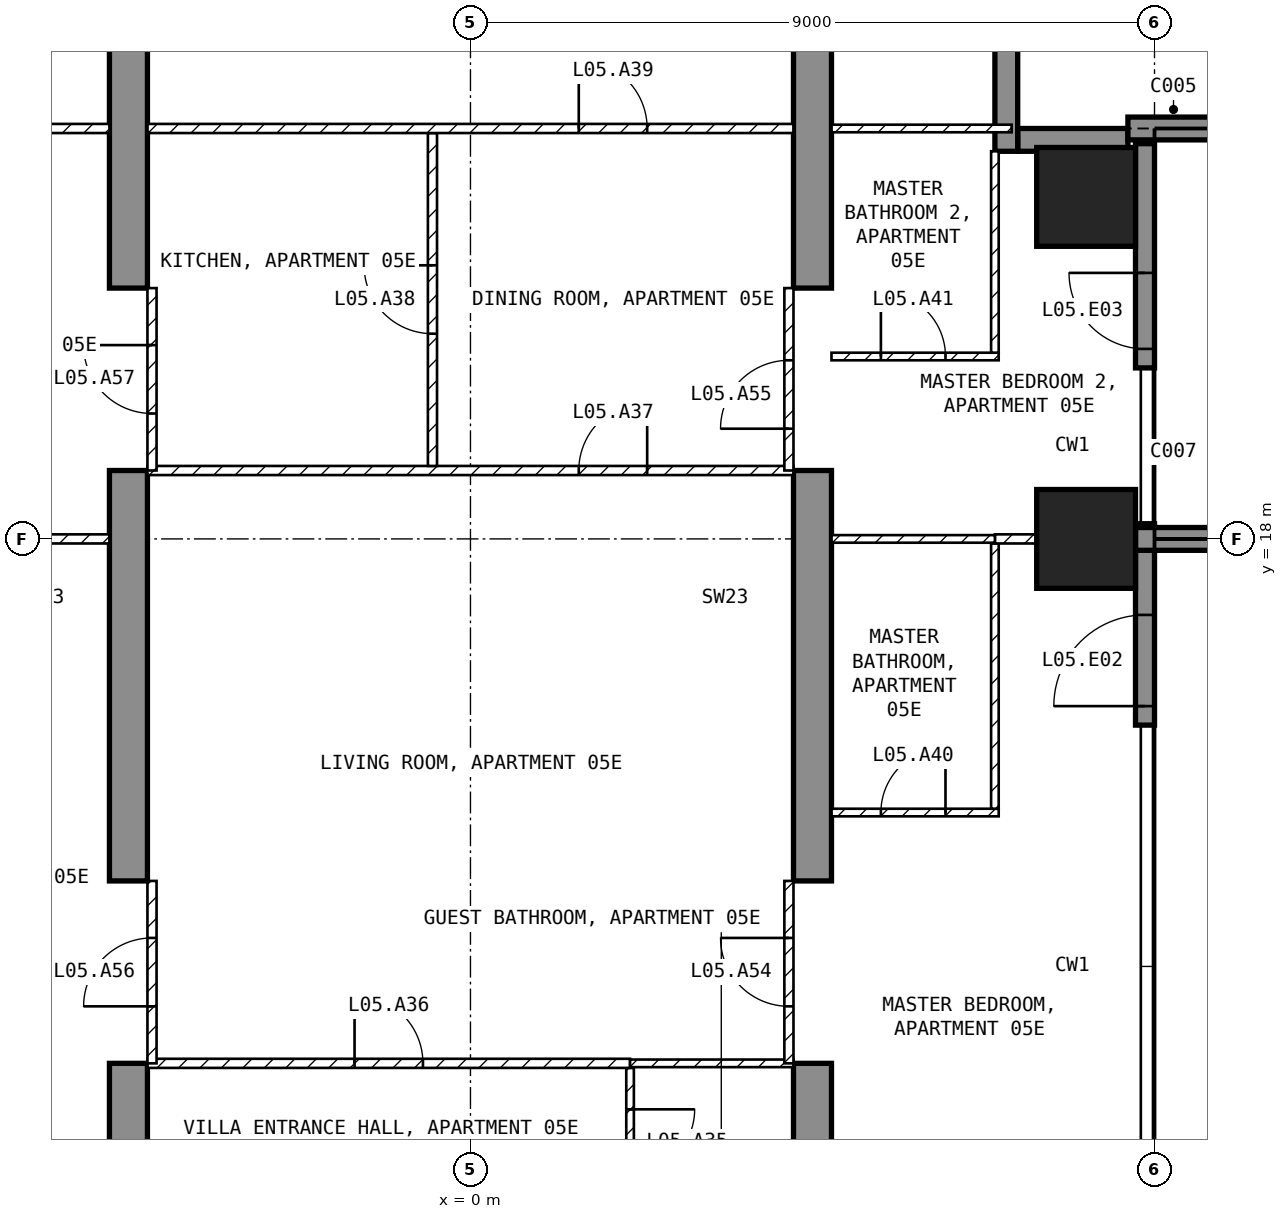
"""IFC4 building model, lengths in metres.
Left out: names, types, materials, properties, quantities, classifications, styles, units other than length and angle.
Written with IfcOpenShell. Run it as: python <this file> out.ifc"""

import sys

from ifc_helpers import new_model, si_unit, direction, frame, frame_2d, origin, origin_2d, place, context, subcontext, project, spatial, polyline, rectangle, outline, extrude, element, fill, save


model = new_model("IFC4")
c1 = context("Model", 3, precision=1e-05, world=origin(), true_north=direction((0.0, 1.0)))
c2 = subcontext(c1, "Body", "Model", "MODEL_VIEW")
j1 = project(units=[si_unit("LENGTHUNIT", "METRE"), si_unit("PLANEANGLEUNIT", "RADIAN")], contexts=[c1])
p1 = place(None, origin())
s1 = spatial("IfcSite", under=j1, at=p1, CompositionType="ELEMENT")
p2 = place(p1, origin())
s2 = spatial("IfcBuilding", under=s1, at=p2, CompositionType="ELEMENT")
p3 = place(p2, frame((0.0, 0.0, 36.5)))
s3 = spatial("IfcBuildingStorey", under=s2, at=p3, CompositionType="ELEMENT", Elevation=36.5)
for number, where, z_axis, x_axis in (
    (1, (8.1, 18.0, -0.25), (0.0, 0.0, 1.0), (1.0, 0.0, 0.0)),
    (2, (8.1, 22.5, -0.25), (0.0, 0.0, 1.0), (1.0, 0.0, 0.0)),
):
    element("IfcColumn", number, at=place(p3, frame(where, z_axis=z_axis, x_axis=x_axis)), inside=s3, PredefinedType="COLUMN", context=c2, shape_type="SweptSolid", body=[
        extrude(rectangle(XDim=1.3, YDim=1.3, at=origin_2d()), origin(), (0.0, 0.0, 1.0), 3.5),
    ])
for number, where, z_axis, x_axis in (
    (3, (-4.75, 9.0, -0.25), (1.0, 0.0, 0.0), (0.0, 1.0, 0.0)),
    (4, (4.25, 9.0, -0.25), (1.0, 0.0, 0.0), (0.0, 1.0, 0.0)),
):
    element("IfcWall", number, at=place(p3, frame(where, z_axis=z_axis, x_axis=x_axis)), inside=s3, PredefinedType="SHEAR", context=c2, shape_type="SweptSolid", body=[
        extrude(outline(polyline([(0.0, 0.0), (2.1, 0.0), (2.1, 2.65), (4.5, 2.65), (4.5, 0.0), (9.9, 0.0), (9.9, 2.65), (12.3, 2.65), (12.3, 0.0), (16.45, 0.0), (16.45, 3.5), (0.0, 3.5), (0.0, 0.0)])), origin(), (0.0, 0.0, 1.0), 0.5),
    ])
p4 = place(p3, frame((8.875, 15.55, 0.0), z_axis=(0.0, 0.0, 1.0), x_axis=(0.0, 1.0, 0.0)))
e5 = element("IfcWall", 5, at=p4, inside=s3, PredefinedType="SOLIDWALL", context=c2, shape_type="SweptSolid", body=[
    extrude(rectangle(XDim=2.65, YDim=0.25, at=frame_2d((1.325, 0.0))), origin(), (0.0, 0.0, 1.0), 3.25),
])
p5 = place(p4, frame((0.25, 0.0, 0.0)))
e6 = element("IfcOpeningElement", 6, at=p5, cuts=e5, PredefinedType="OPENING", context=c2, shape_type="SweptSolid", body=[
    extrude(rectangle(XDim=1.2, YDim=2.4, at=frame_2d((0.6, 1.2))), frame((0.0, 0.135, 0.0), z_axis=(0.0, -1.0, 0.0), x_axis=(1.0, 0.0, 0.0)), (0.0, 0.0, 1.0), 0.27),
])
p6 = place(p3, frame((8.875, 20.25, 0.0), z_axis=(0.0, 0.0, 1.0), x_axis=(0.0, 1.0, 0.0)))
e7 = element("IfcWall", 7, at=p6, inside=s3, PredefinedType="SOLIDWALL", context=c2, shape_type="SweptSolid", body=[
    extrude(rectangle(XDim=2.95, YDim=0.25, at=frame_2d((1.475, 0.0))), origin(), (0.0, 0.0, 1.0), 3.25),
])
p7 = place(p6, frame((0.25, 0.0, 0.0)))
e8 = element("IfcOpeningElement", 8, at=p7, cuts=e7, PredefinedType="OPENING", context=c2, shape_type="SweptSolid", body=[
    extrude(rectangle(XDim=1.0, YDim=2.4, at=frame_2d((0.5, 1.2))), frame((0.0, 0.135, 0.0), z_axis=(0.0, -1.0, 0.0), x_axis=(1.0, 0.0, 0.0)), (0.0, 0.0, 1.0), 0.27),
])
p8 = place(p3, frame((8.65, 23.25, 0.0), z_axis=(0.0, 0.0, 1.0), x_axis=(-1.0, 0.0, 0.0)))
e9 = element("IfcWall", 9, at=p8, inside=s3, PredefinedType="SOLIDWALL", context=c2, shape_type="SweptSolid", body=[
    extrude(rectangle(XDim=1.45, YDim=0.3, at=frame_2d((0.725, 0.0))), origin(), (0.0, 0.0, 1.0), 3.25),
])
p9 = place(p3, frame((7.05, 23.1, 0.0), z_axis=(0.0, 0.0, 1.0), x_axis=(0.0, 1.0, 0.0)))
e10 = element("IfcWall", 10, at=p9, inside=s3, PredefinedType="SOLIDWALL", context=c2, shape_type="SweptSolid", body=[
    extrude(rectangle(XDim=1.8, YDim=0.3, at=frame_2d((0.9, 0.0))), origin(), (0.0, 0.0, 1.0), 3.25),
])
p10 = place(p3, frame((8.75, 18.0, 0.0), z_axis=(0.0, 0.0, 1.0), x_axis=(1.0, 0.0, 0.0)))
e11 = element("IfcWall", 11, at=p10, inside=s3, PredefinedType="SOLIDWALL", context=c2, shape_type="SweptSolid", body=[
    extrude(rectangle(XDim=2.95, YDim=0.3, at=frame_2d((1.475, 0.0))), origin(), (0.0, 0.0, 1.0), 3.25),
])
p11 = place(p3, frame((8.65, 23.4, 0.0), z_axis=(0.0, 0.0, 1.0), x_axis=(1.0, 0.0, 0.0)))
e12 = element("IfcWall", 12, at=p11, inside=s3, PredefinedType="SOLIDWALL", context=c2, shape_type="SweptSolid", body=[
    extrude(rectangle(XDim=3.05, YDim=0.3, at=frame_2d((1.525, 0.0))), origin(), (0.0, 0.0, 1.0), 3.25),
])
p12 = place(p3, frame((2.1, 11.04, 0.0), z_axis=(0.0, 0.0, 1.0), x_axis=(0.0, -1.0, 0.0)))
e13 = element("IfcWall", 13, at=p12, inside=s3, PredefinedType="PARTITIONING", context=c2, shape_type="SweptSolid", body=[
    extrude(rectangle(XDim=1.94, YDim=0.1, at=frame_2d((0.97, 0.0))), origin(), (0.0, 0.0, 1.0), 3.25),
])
p13 = place(p12, frame((0.545, 0.0, 0.0)))
e14 = element("IfcOpeningElement", 14, at=p13, cuts=e13, PredefinedType="OPENING", context=c2, shape_type="SweptSolid", body=[
    extrude(rectangle(XDim=0.85, YDim=2.1, at=frame_2d((0.425, 1.05))), frame((0.0, 0.06, 0.0), z_axis=(0.0, -1.0, 0.0), x_axis=(1.0, 0.0, 0.0)), (0.0, 0.0, 1.0), 0.12),
])
p14 = place(p3, frame((-4.25, 11.1, 0.0), z_axis=(0.0, 0.0, 1.0), x_axis=(1.0, 0.0, 0.0)))
e15 = element("IfcWall", 15, at=p14, inside=s3, PredefinedType="PARTITIONING", context=c2, shape_type="SweptSolid", body=[
    extrude(rectangle(XDim=6.35, YDim=0.12, at=frame_2d((3.175, 0.0))), origin(), (0.0, 0.0, 1.0), 3.25),
])
p15 = place(p14, frame((2.725, 0.0, 0.0)))
e16 = element("IfcOpeningElement", 16, at=p15, cuts=e15, PredefinedType="OPENING", context=c2, shape_type="SweptSolid", body=[
    extrude(rectangle(XDim=0.9, YDim=2.1, at=frame_2d((0.45, 1.05))), frame((0.0, 0.07, 0.0), z_axis=(0.0, -1.0, 0.0), x_axis=(1.0, 0.0, 0.0)), (0.0, 0.0, 1.0), 0.14),
])
p16 = place(p3, frame((2.1, 11.1, 0.0), z_axis=(0.0, 0.0, 1.0), x_axis=(1.0, 0.0, 0.0)))
e17 = element("IfcWall", 17, at=p16, inside=s3, PredefinedType="PARTITIONING", context=c2, shape_type="SweptSolid", body=[
    extrude(rectangle(XDim=2.15, YDim=0.1, at=frame_2d((1.075, 0.0))), origin(), (0.0, 0.0, 1.0), 3.25),
])
p17 = place(p3, frame((-4.25, 18.9, 0.0), z_axis=(0.0, 0.0, 1.0), x_axis=(1.0, 0.0, 0.0)))
e18 = element("IfcWall", 18, at=p17, inside=s3, PredefinedType="PARTITIONING", context=c2, shape_type="SweptSolid", body=[
    extrude(rectangle(XDim=8.5, YDim=0.12, at=frame_2d((4.25, 0.0))), origin(), (0.0, 0.0, 1.0), 3.25),
])
p18 = place(p17, frame((5.675, 0.0, 0.0)))
e19 = element("IfcOpeningElement", 19, at=p18, cuts=e18, PredefinedType="OPENING", context=c2, shape_type="SweptSolid", body=[
    extrude(rectangle(XDim=0.9, YDim=2.1, at=frame_2d((0.45, 1.05))), frame((0.0, 0.07, 0.0), z_axis=(0.0, -1.0, 0.0), x_axis=(1.0, 0.0, 0.0)), (0.0, 0.0, 1.0), 0.14),
])
p19 = place(p3, frame((-0.5, 18.96, 0.0), z_axis=(0.0, 0.0, 1.0), x_axis=(0.0, 1.0, 0.0)))
e20 = element("IfcWall", 20, at=p19, inside=s3, PredefinedType="PARTITIONING", context=c2, shape_type="SweptSolid", body=[
    extrude(rectangle(XDim=4.38, YDim=0.12, at=frame_2d((2.19, 0.0))), origin(), (0.0, 0.0, 1.0), 3.25),
])
p20 = place(p19, frame((1.74, 0.0, 0.0)))
e21 = element("IfcOpeningElement", 21, at=p20, cuts=e20, PredefinedType="OPENING", context=c2, shape_type="SweptSolid", body=[
    extrude(rectangle(XDim=0.9, YDim=2.1, at=frame_2d((0.45, 1.05))), frame((0.0, 0.07, 0.0), z_axis=(0.0, -1.0, 0.0), x_axis=(1.0, 0.0, 0.0)), (0.0, 0.0, 1.0), 0.14),
])
p21 = place(p3, frame((-4.25, 23.4, 0.0), z_axis=(0.0, 0.0, 1.0), x_axis=(1.0, 0.0, 0.0)))
e22 = element("IfcWall", 22, at=p21, inside=s3, PredefinedType="PARTITIONING", context=c2, shape_type="SweptSolid", body=[
    extrude(rectangle(XDim=8.5, YDim=0.12, at=frame_2d((4.25, 0.0))), origin(), (0.0, 0.0, 1.0), 3.25),
])
p22 = place(p21, frame((5.675, 0.0, 0.0)))
e23 = element("IfcOpeningElement", 23, at=p22, cuts=e22, PredefinedType="OPENING", context=c2, shape_type="SweptSolid", body=[
    extrude(rectangle(XDim=0.9, YDim=2.1, at=frame_2d((0.45, 1.05))), frame((0.0, 0.07, 0.0), z_axis=(0.0, -1.0, 0.0), x_axis=(1.0, 0.0, 0.0)), (0.0, 0.0, 1.0), 0.14),
])
p23 = place(p3, frame((4.75, 14.4, 0.0), z_axis=(0.0, 0.0, 1.0), x_axis=(1.0, 0.0, 0.0)))
e24 = element("IfcWall", 24, at=p23, inside=s3, PredefinedType="PARTITIONING", context=c2, shape_type="SweptSolid", body=[
    extrude(rectangle(XDim=2.2, YDim=0.1, at=frame_2d((1.1, 0.0))), origin(), (0.0, 0.0, 1.0), 3.25),
])
p24 = place(p23, frame((0.65, 0.0, 0.0)))
e25 = element("IfcOpeningElement", 25, at=p24, cuts=e24, PredefinedType="OPENING", context=c2, shape_type="SweptSolid", body=[
    extrude(rectangle(XDim=0.85, YDim=2.1, at=frame_2d((0.425, 1.05))), frame((0.0, 0.06, 0.0), z_axis=(0.0, -1.0, 0.0), x_axis=(1.0, 0.0, 0.0)), (0.0, 0.0, 1.0), 0.12),
])
p25 = place(p3, frame((6.9, 14.45, 0.0), z_axis=(0.0, 0.0, 1.0), x_axis=(0.0, 1.0, 0.0)))
e26 = element("IfcWall", 26, at=p25, inside=s3, PredefinedType="PARTITIONING", context=c2, shape_type="SweptSolid", body=[
    extrude(rectangle(XDim=3.49, YDim=0.1, at=frame_2d((1.745, 0.0))), origin(), (0.0, 0.0, 1.0), 3.25),
])
p26 = place(p3, frame((6.9, 18.0, 0.0), z_axis=(0.0, 0.0, 1.0), x_axis=(1.0, 0.0, 0.0)))
e27 = element("IfcWall", 27, at=p26, inside=s3, PredefinedType="PARTITIONING", context=c2, shape_type="SweptSolid", body=[
    extrude(rectangle(XDim=0.55, YDim=0.12, at=frame_2d((0.275, 0.0))), origin(), (0.0, 0.0, 1.0), 2.346),
])
p27 = place(p3, frame((4.75, 18.0, 0.0), z_axis=(0.0, 0.0, 1.0), x_axis=(1.0, 0.0, 0.0)))
e28 = element("IfcWall", 28, at=p27, inside=s3, PredefinedType="PARTITIONING", context=c2, shape_type="SweptSolid", body=[
    extrude(rectangle(XDim=2.15, YDim=0.1, at=frame_2d((1.075, 0.0))), origin(), (0.0, 0.0, 1.0), 2.346),
])
p28 = place(p3, frame((4.75, 20.4, 0.0), z_axis=(0.0, 0.0, 1.0), x_axis=(1.0, 0.0, 0.0)))
e29 = element("IfcWall", 29, at=p28, inside=s3, PredefinedType="PARTITIONING", context=c2, shape_type="SweptSolid", body=[
    extrude(rectangle(XDim=2.2, YDim=0.1, at=frame_2d((1.1, 0.0))), origin(), (0.0, 0.0, 1.0), 3.25),
])
p29 = place(p28, frame((0.65, 0.0, 0.0)))
e30 = element("IfcOpeningElement", 30, at=p29, cuts=e29, PredefinedType="OPENING", context=c2, shape_type="SweptSolid", body=[
    extrude(rectangle(XDim=0.85, YDim=2.1, at=frame_2d((0.425, 1.05))), frame((0.0, 0.06, 0.0), z_axis=(0.0, -1.0, 0.0), x_axis=(1.0, 0.0, 0.0)), (0.0, 0.0, 1.0), 0.12),
])
p30 = place(p3, frame((6.9, 20.45, 0.0), z_axis=(0.0, 0.0, 1.0), x_axis=(0.0, 1.0, 0.0)))
e31 = element("IfcWall", 31, at=p30, inside=s3, PredefinedType="PARTITIONING", context=c2, shape_type="SweptSolid", body=[
    extrude(rectangle(XDim=2.65, YDim=0.1, at=frame_2d((1.325, 0.0))), origin(), (0.0, 0.0, 1.0), 3.25),
])
p31 = place(p3, frame((4.75, 23.4, 0.0), z_axis=(0.0, 0.0, 1.0), x_axis=(1.0, 0.0, 0.0)))
e32 = element("IfcWall", 32, at=p31, inside=s3, PredefinedType="PARTITIONING", context=c2, shape_type="SweptSolid", body=[
    extrude(rectangle(XDim=2.37, YDim=0.1, at=frame_2d((1.185, 0.0))), origin(), (0.0, 0.0, 1.0), 3.25),
])
p32 = place(p3, frame((-7.45, 18.0, 0.0), z_axis=(0.0, 0.0, 1.0), x_axis=(1.0, 0.0, 0.0)))
e33 = element("IfcWall", 33, at=p32, inside=s3, PredefinedType="PARTITIONING", context=c2, shape_type="SweptSolid", body=[
    extrude(rectangle(XDim=2.7, YDim=0.12, at=frame_2d((1.35, 0.0))), origin(), (0.0, 0.0, 1.0), 2.346),
])
p33 = place(p3, frame((-7.12, 23.4, 0.0), z_axis=(0.0, 0.0, 1.0), x_axis=(1.0, 0.0, 0.0)))
e34 = element("IfcWall", 34, at=p33, inside=s3, PredefinedType="PARTITIONING", context=c2, shape_type="SweptSolid", body=[
    extrude(rectangle(XDim=2.37, YDim=0.12, at=frame_2d((1.185, 0.0))), origin(), (0.0, 0.0, 1.0), 3.25),
])
p34 = place(p3, frame((4.19, 11.1, 0.0), z_axis=(0.0, 0.0, 1.0), x_axis=(0.0, 1.0, 0.0)))
e35 = element("IfcWall", 35, at=p34, inside=s3, PredefinedType="PARTITIONING", context=c2, shape_type="SweptSolid", body=[
    extrude(rectangle(XDim=2.4, YDim=0.12, at=frame_2d((1.2, 0.0))), origin(), (0.0, 0.0, 1.0), 2.4),
])
p35 = place(p34, frame((0.75, 0.0, 0.0)))
e36 = element("IfcOpeningElement", 36, at=p35, cuts=e35, PredefinedType="OPENING", context=c2, shape_type="SweptSolid", body=[
    extrude(rectangle(XDim=0.9, YDim=2.1, at=frame_2d((0.45, 1.05))), frame((0.0, 0.07, 0.0), z_axis=(0.0, -1.0, 0.0), x_axis=(1.0, 0.0, 0.0)), (0.0, 0.0, 1.0), 0.14),
])
p36 = place(p3, frame((4.19, 18.9, 0.0), z_axis=(0.0, 0.0, 1.0), x_axis=(0.0, 1.0, 0.0)))
e37 = element("IfcWall", 37, at=p36, inside=s3, PredefinedType="PARTITIONING", context=c2, shape_type="SweptSolid", body=[
    extrude(rectangle(XDim=2.4, YDim=0.12, at=frame_2d((1.2, 0.0))), origin(), (0.0, 0.0, 1.0), 2.4),
])
p37 = place(p36, frame((0.55, 0.0, 0.0)))
e38 = element("IfcOpeningElement", 38, at=p37, cuts=e37, PredefinedType="OPENING", context=c2, shape_type="SweptSolid", body=[
    extrude(rectangle(XDim=0.9, YDim=2.1, at=frame_2d((0.45, 1.05))), frame((0.0, 0.07, 0.0), z_axis=(0.0, -1.0, 0.0), x_axis=(1.0, 0.0, 0.0)), (0.0, 0.0, 1.0), 0.14),
])
p38 = place(p3, frame((-4.19, 11.1, 0.0), z_axis=(0.0, 0.0, 1.0), x_axis=(0.0, 1.0, 0.0)))
e39 = element("IfcWall", 39, at=p38, inside=s3, PredefinedType="PARTITIONING", context=c2, shape_type="SweptSolid", body=[
    extrude(rectangle(XDim=2.4, YDim=0.12, at=frame_2d((1.2, 0.0))), origin(), (0.0, 0.0, 1.0), 2.4),
])
p39 = place(p38, frame((0.75, 0.0, 0.0)))
e40 = element("IfcOpeningElement", 40, at=p39, cuts=e39, PredefinedType="OPENING", context=c2, shape_type="SweptSolid", body=[
    extrude(rectangle(XDim=0.9, YDim=2.1, at=frame_2d((0.45, 1.05))), frame((0.0, 0.07, 0.0), z_axis=(0.0, -1.0, 0.0), x_axis=(1.0, 0.0, 0.0)), (0.0, 0.0, 1.0), 0.14),
])
p40 = place(p3, frame((-4.19, 18.9, 0.0), z_axis=(0.0, 0.0, 1.0), x_axis=(0.0, 1.0, 0.0)))
e41 = element("IfcWall", 41, at=p40, inside=s3, PredefinedType="PARTITIONING", context=c2, shape_type="SweptSolid", body=[
    extrude(rectangle(XDim=2.4, YDim=0.12, at=frame_2d((1.2, 0.0))), origin(), (0.0, 0.0, 1.0), 2.4),
])
p41 = place(p40, frame((0.75, 0.0, 0.0)))
e42 = element("IfcOpeningElement", 42, at=p41, cuts=e41, PredefinedType="OPENING", context=c2, shape_type="SweptSolid", body=[
    extrude(rectangle(XDim=0.9, YDim=2.1, at=frame_2d((0.45, 1.05))), frame((0.0, 0.07, 0.0), z_axis=(0.0, -1.0, 0.0), x_axis=(1.0, 0.0, 0.0)), (0.0, 0.0, 1.0), 0.14),
])
p42 = place(p5, origin())
e43 = element("IfcDoor", 43, at=p42, inside=s3, OperationType="SINGLE_SWING_LEFT", PredefinedType="DOOR", context=c2, shape_type="SweptSolid", body=[
    extrude(rectangle(XDim=1.2, YDim=2.4, at=frame_2d((0.6, 1.2))), frame((0.0, 0.025, 0.0), z_axis=(0.0, -1.0, 0.0), x_axis=(1.0, 0.0, 0.0)), (0.0, 0.0, 1.0), 0.05),
])
fill(e6, e43)
p43 = place(p7, origin())
e44 = element("IfcDoor", 44, at=p43, inside=s3, OperationType="SINGLE_SWING_RIGHT", PredefinedType="DOOR", context=c2, shape_type="SweptSolid", body=[
    extrude(rectangle(XDim=1.0, YDim=2.4, at=frame_2d((0.5, 1.2))), frame((0.0, 0.025, 0.0), z_axis=(0.0, -1.0, 0.0), x_axis=(1.0, 0.0, 0.0)), (0.0, 0.0, 1.0), 0.05),
])
fill(e8, e44)
p44 = place(p13, origin())
e45 = element("IfcDoor", 45, at=p44, inside=s3, OperationType="SINGLE_SWING_LEFT", PredefinedType="DOOR", context=c2, shape_type="SweptSolid", body=[
    extrude(rectangle(XDim=0.85, YDim=2.1, at=frame_2d((0.425, 1.05))), frame((0.0, 0.025, 0.0), z_axis=(0.0, -1.0, 0.0), x_axis=(1.0, 0.0, 0.0)), (0.0, 0.0, 1.0), 0.05),
])
fill(e14, e45)
p45 = place(p15, origin())
e46 = element("IfcDoor", 46, at=p45, inside=s3, OperationType="SINGLE_SWING_LEFT", PredefinedType="DOOR", context=c2, shape_type="SweptSolid", body=[
    extrude(rectangle(XDim=0.9, YDim=2.1, at=frame_2d((0.45, 1.05))), frame((0.0, 0.025, 0.0), z_axis=(0.0, -1.0, 0.0), x_axis=(1.0, 0.0, 0.0)), (0.0, 0.0, 1.0), 0.05),
])
fill(e16, e46)
p46 = place(p18, origin())
e47 = element("IfcDoor", 47, at=p46, inside=s3, OperationType="SINGLE_SWING_RIGHT", PredefinedType="DOOR", context=c2, shape_type="SweptSolid", body=[
    extrude(rectangle(XDim=0.9, YDim=2.1, at=frame_2d((0.45, 1.05))), frame((0.0, 0.025, 0.0), z_axis=(0.0, -1.0, 0.0), x_axis=(1.0, 0.0, 0.0)), (0.0, 0.0, 1.0), 0.05),
])
fill(e19, e47)
p47 = place(p20, origin())
e48 = element("IfcDoor", 48, at=p47, inside=s3, OperationType="SINGLE_SWING_RIGHT", PredefinedType="DOOR", context=c2, shape_type="SweptSolid", body=[
    extrude(rectangle(XDim=0.9, YDim=2.1, at=frame_2d((0.45, 1.05))), frame((0.0, 0.025, 0.0), z_axis=(0.0, -1.0, 0.0), x_axis=(1.0, 0.0, 0.0)), (0.0, 0.0, 1.0), 0.05),
])
fill(e21, e48)
p48 = place(p22, origin())
e49 = element("IfcDoor", 49, at=p48, inside=s3, OperationType="SINGLE_SWING_LEFT", PredefinedType="DOOR", context=c2, shape_type="SweptSolid", body=[
    extrude(rectangle(XDim=0.9, YDim=2.1, at=frame_2d((0.45, 1.05))), frame((0.0, 0.025, 0.0), z_axis=(0.0, -1.0, 0.0), x_axis=(1.0, 0.0, 0.0)), (0.0, 0.0, 1.0), 0.05),
])
fill(e23, e49)
p49 = place(p24, origin())
e50 = element("IfcDoor", 50, at=p49, inside=s3, OperationType="SINGLE_SWING_RIGHT", PredefinedType="DOOR", context=c2, shape_type="SweptSolid", body=[
    extrude(rectangle(XDim=0.85, YDim=2.1, at=frame_2d((0.425, 1.05))), frame((0.0, 0.025, 0.0), z_axis=(0.0, -1.0, 0.0), x_axis=(1.0, 0.0, 0.0)), (0.0, 0.0, 1.0), 0.05),
])
fill(e25, e50)
p50 = place(p29, origin())
e51 = element("IfcDoor", 51, at=p50, inside=s3, OperationType="SINGLE_SWING_LEFT", PredefinedType="DOOR", context=c2, shape_type="SweptSolid", body=[
    extrude(rectangle(XDim=0.85, YDim=2.1, at=frame_2d((0.425, 1.05))), frame((0.0, 0.025, 0.0), z_axis=(0.0, -1.0, 0.0), x_axis=(1.0, 0.0, 0.0)), (0.0, 0.0, 1.0), 0.05),
])
fill(e30, e51)
p51 = place(p35, origin())
e52 = element("IfcDoor", 52, at=p51, inside=s3, OperationType="SINGLE_SWING_RIGHT", PredefinedType="DOOR", context=c2, shape_type="SweptSolid", body=[
    extrude(rectangle(XDim=0.9, YDim=2.1, at=frame_2d((0.45, 1.05))), frame((0.0, 0.025, 0.0), z_axis=(0.0, -1.0, 0.0), x_axis=(1.0, 0.0, 0.0)), (0.0, 0.0, 1.0), 0.05),
])
fill(e36, e52)
p52 = place(p37, origin())
e53 = element("IfcDoor", 53, at=p52, inside=s3, OperationType="SINGLE_SWING_LEFT", PredefinedType="DOOR", context=c2, shape_type="SweptSolid", body=[
    extrude(rectangle(XDim=0.9, YDim=2.1, at=frame_2d((0.45, 1.05))), frame((0.0, 0.025, 0.0), z_axis=(0.0, -1.0, 0.0), x_axis=(1.0, 0.0, 0.0)), (0.0, 0.0, 1.0), 0.05),
])
fill(e38, e53)
p53 = place(p39, origin())
e54 = element("IfcDoor", 54, at=p53, inside=s3, OperationType="SINGLE_SWING_LEFT", PredefinedType="DOOR", context=c2, shape_type="SweptSolid", body=[
    extrude(rectangle(XDim=0.9, YDim=2.1, at=frame_2d((0.45, 1.05))), frame((0.0, 0.025, 0.0), z_axis=(0.0, -1.0, 0.0), x_axis=(1.0, 0.0, 0.0)), (0.0, 0.0, 1.0), 0.05),
])
fill(e40, e54)
p54 = place(p41, origin())
e55 = element("IfcDoor", 55, at=p54, inside=s3, OperationType="SINGLE_SWING_RIGHT", PredefinedType="DOOR", context=c2, shape_type="SweptSolid", body=[
    extrude(rectangle(XDim=0.9, YDim=2.1, at=frame_2d((0.45, 1.05))), frame((0.0, 0.025, 0.0), z_axis=(0.0, -1.0, 0.0), x_axis=(1.0, 0.0, 0.0)), (0.0, 0.0, 1.0), 0.05),
])
fill(e42, e55)
save(model, sys.argv[1])
